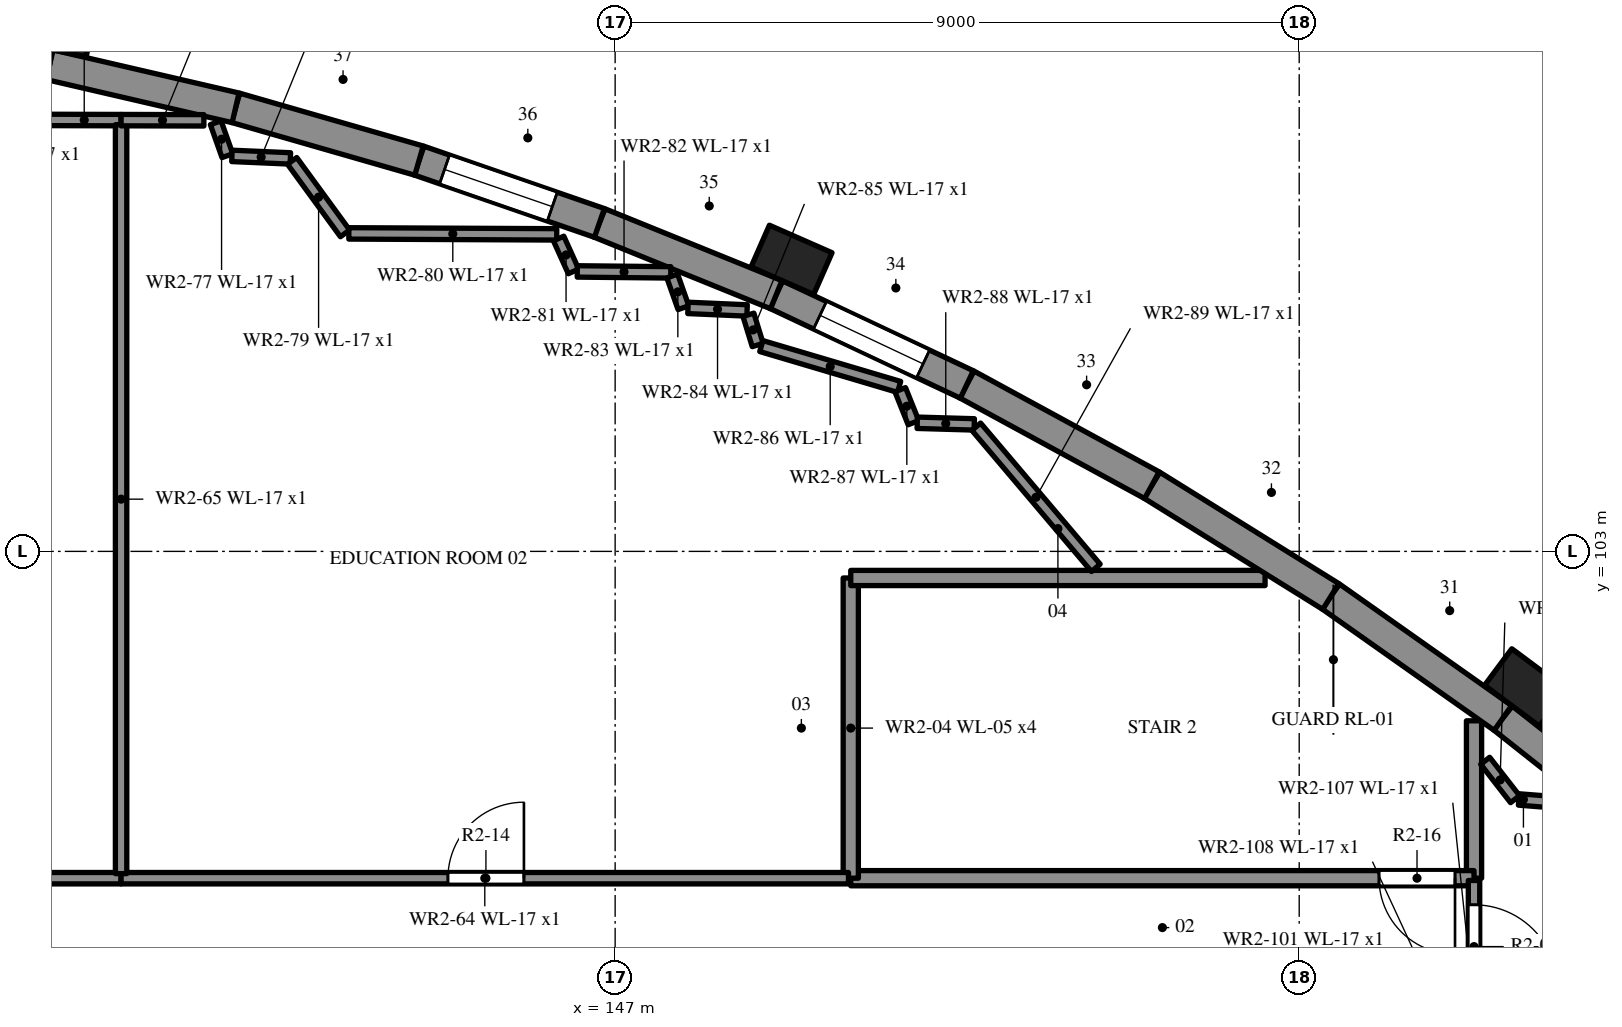
"""IFC4 building model, lengths in metres.
Left out: names, types, materials, properties, quantities, classifications, styles, units other than length and angle.
Written with IfcOpenShell. Run it as: python <this file> out.ifc"""

import sys

from ifc_helpers import new_model, si_unit, direction, frame, frame_2d, origin, origin_2d, place, context, subcontext, project, spatial, polyline, rectangle, outline, extrude, element, fill, save


model = new_model("IFC4")
c1 = context("Model", 3, precision=1e-05, world=origin(), true_north=direction((0.0, 1.0)))
c2 = subcontext(c1, "Body", "Model", "MODEL_VIEW")
j1 = project(units=[si_unit("LENGTHUNIT", "METRE"), si_unit("PLANEANGLEUNIT", "RADIAN")], contexts=[c1])
p1 = place(None, origin())
s1 = spatial("IfcSite", under=j1, at=p1, CompositionType="ELEMENT")
p2 = place(p1, origin())
s2 = spatial("IfcBuilding", under=s1, at=p2, CompositionType="ELEMENT")
p3 = place(p2, frame((0.0, 0.0, 10.2)))
s3 = spatial("IfcBuildingStorey", under=s2, at=p3, CompositionType="ELEMENT", Elevation=10.2)
p4 = place(p3, frame((158.3, 100.771, 0.0), z_axis=(0.0, 0.0, 1.0), x_axis=(0.0, -1.0, 0.0)))
e1 = element("IfcWall", 1, at=p4, inside=s3, PredefinedType="SHEAR", context=c2, shape_type="SweptSolid", body=[
    extrude(outline(polyline([(0.0, 0.0), (2.071, 0.0), (2.071, 5.912), (1.994, 5.842), (0.0, 4.028), (0.0, 0.0)])), frame((0.0, 0.1, 0.0), z_axis=(0.0, -1.0, 0.0), x_axis=(1.0, 0.0, 0.0)), (0.0, 0.0, 1.0), 0.2),
])
p5 = place(p3, frame((158.3, 98.7, 0.0), z_axis=(0.0, 0.0, 1.0), x_axis=(-1.0, 0.0, 0.0)))
e2 = element("IfcWall", 2, at=p5, inside=s3, PredefinedType="SHEAR", context=c2, shape_type="SweptSolid", body=[
    extrude(outline(polyline([(0.0, 0.0), (8.2, 0.0), (8.2, 9.347), (0.381, 5.882), (0.304, 5.911), (0.229, 5.899), (0.062, 5.861), (0.0, 5.845), (0.0, 0.0)])), frame((0.0, 0.1, 0.0), z_axis=(0.0, -1.0, 0.0), x_axis=(1.0, 0.0, 0.0)), (0.0, 0.0, 1.0), 0.2),
])
p6 = place(p5, frame((0.25, 0.0, 0.0)))
e3 = element("IfcOpeningElement", 3, at=p6, cuts=e2, PredefinedType="OPENING", context=c2, shape_type="SweptSolid", body=[
    extrude(rectangle(XDim=1.0, YDim=2.4, at=frame_2d((0.5, 1.2))), frame((0.0, 0.11, 0.0), z_axis=(0.0, -1.0, 0.0), x_axis=(1.0, 0.0, 0.0)), (0.0, 0.0, 1.0), 0.22),
])
p7 = place(p3, frame((150.1, 98.7, 0.0), z_axis=(0.0, 0.0, 1.0), x_axis=(0.0, 1.0, 0.0)))
e4 = element("IfcWall", 4, at=p7, inside=s3, PredefinedType="SHEAR", context=c2, shape_type="SweptSolid", body=[
    extrude(outline(polyline([(0.0, 0.0), (3.95, 0.0), (3.95, 6.132), (2.287, 7.484), (1.991, 7.714), (1.697, 7.948), (0.427, 8.954), (0.304, 9.081), (0.181, 9.214), (0.0, 9.411), (0.0, 0.0)])), frame((0.0, 0.1, 0.0), z_axis=(0.0, -1.0, 0.0), x_axis=(1.0, 0.0, 0.0)), (0.0, 0.0, 1.0), 0.2),
])
p8 = place(p3, frame((150.1, 102.65, 0.0), z_axis=(0.0, 0.0, 1.0), x_axis=(1.0, 0.0, 0.0)))
e5 = element("IfcWall", 5, at=p8, inside=s3, PredefinedType="SHEAR", context=c2, shape_type="SweptSolid", body=[
    extrude(outline(polyline([(0.0, 0.0), (5.451, 0.0), (5.451, 2.872), (4.967, 2.948), (4.89, 2.959), (4.814, 2.93), (3.049, 3.712), (2.968, 3.784), (2.886, 3.849), (0.698, 5.603), (0.63, 5.657), (0.0, 6.125), (0.0, 0.0)])), frame((0.0, 0.1, 0.0), z_axis=(0.0, -1.0, 0.0), x_axis=(1.0, 0.0, 0.0)), (0.0, 0.0, 1.0), 0.2),
])
p9 = place(p3, frame((160.613, 99.28, 0.0), z_axis=(0.0, 0.0, 1.0), x_axis=(-0.784278812541, 0.620408530082, 0.0)))
e6 = element("IfcWall", 6, at=p9, inside=s3, PredefinedType="SOLIDWALL", context=c2, shape_type="SweptSolid", body=[
    extrude(outline(polyline([(0.0, 0.0), (2.464, 0.0), (2.464, 3.551), (2.446, 3.544), (2.288, 3.486), (2.129, 3.428), (0.051, 2.669), (0.0, 2.651), (0.0, 0.0)])), frame((0.0, 0.2, 0.0), z_axis=(0.0, -1.0, 0.0), x_axis=(1.0, 0.0, 0.0)), (0.0, 0.0, 1.0), 0.4),
])
p10 = place(p3, frame((158.68, 100.809, 0.0), z_axis=(0.0, 0.0, 1.0), x_axis=(-0.817070367038, 0.57653795652, 0.0)))
e7 = element("IfcWall", 7, at=p10, inside=s3, PredefinedType="SOLIDWALL", context=c2, shape_type="SweptSolid", body=[
    extrude(outline(polyline([(0.0, 0.0), (2.772, 0.0), (2.772, 2.848), (2.406, 2.968), (0.311, 3.647), (0.169, 3.693), (0.0, 3.555), (0.0, 0.0)])), frame((0.0, 0.2, 0.0), z_axis=(0.0, -1.0, 0.0), x_axis=(1.0, 0.0, 0.0)), (0.0, 0.0, 1.0), 0.4),
])
p11 = place(p3, frame((156.415, 102.407, 0.0), z_axis=(0.0, 0.0, 1.0), x_axis=(-0.84912946359, 0.528184772653, 0.0)))
e8 = element("IfcWall", 8, at=p11, inside=s3, PredefinedType="SOLIDWALL", context=c2, shape_type="SweptSolid", body=[
    extrude(outline(polyline([(0.0, 0.0), (2.772, 0.0), (2.772, 1.97), (2.247, 2.14), (0.321, 2.757), (0.0, 2.845), (0.0, 0.0)])), frame((0.0, 0.2, 0.0), z_axis=(0.0, -1.0, 0.0), x_axis=(1.0, 0.0, 0.0)), (0.0, 0.0, 1.0), 0.4),
])
p12 = place(p3, frame((154.062, 103.871, 0.0), z_axis=(0.0, 0.0, 1.0), x_axis=(-0.878255502871, 0.478191668347, 0.0)))
e9 = element("IfcWall", 9, at=p12, inside=s3, PredefinedType="SOLIDWALL", context=c2, shape_type="SweptSolid", body=[
    extrude(outline(polyline([(0.0, 0.0), (2.772, 0.0), (2.772, 2.783), (2.737, 2.771), (0.081, 1.944), (0.0, 1.966), (0.0, 0.0)])), frame((0.0, 0.2, 0.0), z_axis=(0.0, -1.0, 0.0), x_axis=(1.0, 0.0, 0.0)), (0.0, 0.0, 1.0), 0.4),
])
p13 = place(p3, frame((151.627, 105.196, 0.0), z_axis=(0.0, 0.0, 1.0), x_axis=(-0.904561064695, 0.42634408667, 0.0)))
e10 = element("IfcWall", 10, at=p13, inside=s3, PredefinedType="SOLIDWALL", context=c2, shape_type="SweptSolid", body=[
    extrude(outline(polyline([(0.0, 0.0), (2.772, 0.0), (2.772, 3.692), (2.75, 3.685), (2.656, 3.655), (2.562, 3.624), (0.0, 2.787), (0.0, 0.0)])), frame((0.0, 0.2, 0.0), z_axis=(0.0, -1.0, 0.0), x_axis=(1.0, 0.0, 0.0)), (0.0, 0.0, 1.0), 0.4),
])
p14 = place(p13, frame((0.636, 0.0, 0.9)))
e11 = element("IfcOpeningElement", 11, at=p14, cuts=e10, PredefinedType="OPENING", context=c2, shape_type="SweptSolid", body=[
    extrude(rectangle(XDim=1.5, YDim=1.2, at=frame_2d((0.75, 0.6))), frame((0.0, 0.21, 0.0), z_axis=(0.0, -1.0, 0.0), x_axis=(1.0, 0.0, 0.0)), (0.0, 0.0, 1.0), 0.42),
])
p15 = place(p3, frame((149.12, 106.378, 0.0), z_axis=(0.0, 0.0, 1.0), x_axis=(-0.926688932252, 0.375829246921, 0.0)))
e12 = element("IfcWall", 12, at=p15, inside=s3, PredefinedType="SOLIDWALL", context=c2, shape_type="SweptSolid", body=[
    extrude(outline(polyline([(0.0, 0.0), (2.511, 0.0), (2.511, 2.896), (2.367, 2.947), (0.194, 3.726), (0.113, 3.755), (0.0, 3.696), (0.0, 0.0)])), frame((0.0, 0.2, 0.0), z_axis=(0.0, -1.0, 0.0), x_axis=(1.0, 0.0, 0.0)), (0.0, 0.0, 1.0), 0.4),
])
p16 = place(p3, frame((146.793, 107.322, 0.0), z_axis=(0.0, 0.0, 1.0), x_axis=(-0.945175475032, 0.326562890417, 0.0)))
e13 = element("IfcWall", 13, at=p16, inside=s3, PredefinedType="SOLIDWALL", context=c2, shape_type="SweptSolid", body=[
    extrude(outline(polyline([(0.0, 0.0), (2.511, 0.0), (2.511, 2.004), (2.321, 2.066), (0.129, 2.852), (0.0, 2.892), (0.0, 0.0)])), frame((0.0, 0.2, 0.0), z_axis=(0.0, -1.0, 0.0), x_axis=(1.0, 0.0, 0.0)), (0.0, 0.0, 1.0), 0.4),
])
p17 = place(p16, frame((0.656, 0.0, 0.9)))
e14 = element("IfcOpeningElement", 14, at=p17, cuts=e13, PredefinedType="OPENING", context=c2, shape_type="SweptSolid", body=[
    extrude(rectangle(XDim=1.5, YDim=0.9, at=frame_2d((0.75, 0.45))), frame((0.0, 0.21, 0.0), z_axis=(0.0, -1.0, 0.0), x_axis=(1.0, 0.0, 0.0)), (0.0, 0.0, 1.0), 0.42),
])
p18 = place(p3, frame((144.419, 108.142, 0.0), z_axis=(0.0, 0.0, 1.0), x_axis=(-0.961008605775, 0.276518461637, 0.0)))
e15 = element("IfcWall", 15, at=p18, inside=s3, PredefinedType="SOLIDWALL", context=c2, shape_type="SweptSolid", body=[
    extrude(outline(polyline([(0.0, 0.0), (2.511, 0.0), (2.511, 2.907), (2.499, 2.903), (0.0, 2.007), (0.0, 0.0)])), frame((0.0, 0.2, 0.0), z_axis=(0.0, -1.0, 0.0), x_axis=(1.0, 0.0, 0.0)), (0.0, 0.0, 1.0), 0.4),
])
p19 = place(p3, frame((142.006, 108.836, 0.0), z_axis=(0.0, 0.0, 1.0), x_axis=(-0.974189274843, 0.225732710925, 0.0)))
e16 = element("IfcWall", 16, at=p19, inside=s3, PredefinedType="SOLIDWALL", context=c2, shape_type="SweptSolid", body=[
    extrude(outline(polyline([(0.0, 0.0), (2.511, 0.0), (2.511, 3.813), (2.472, 3.799), (2.379, 3.766), (0.0, 2.911), (0.0, 0.0)])), frame((0.0, 0.2, 0.0), z_axis=(0.0, -1.0, 0.0), x_axis=(1.0, 0.0, 0.0)), (0.0, 0.0, 1.0), 0.4),
])
p20 = place(p3, frame((139.66, 109.893, 0.0), z_axis=(0.0, 0.0, 1.0), x_axis=(-0.979575047818, 0.201078904144, 0.0)))
e17 = element("IfcColumn", 17, at=p20, inside=s3, PredefinedType="PILASTER", context=c2, shape_type="SweptSolid", body=[
    extrude(rectangle(XDim=0.9, YDim=0.6, at=origin_2d()), origin(), (0.0, 0.0, 1.0), 3.247),
])
p21 = place(p3, frame((149.321, 106.836, 0.0), z_axis=(0.0, 0.0, 1.0), x_axis=(-0.915419314521, 0.402501526211, 0.0)))
e18 = element("IfcColumn", 18, at=p21, inside=s3, PredefinedType="PILASTER", context=c2, shape_type="SweptSolid", body=[
    extrude(rectangle(XDim=0.9, YDim=0.6, at=origin_2d()), origin(), (0.0, 0.0, 1.0), 2.91),
])
p22 = place(p3, frame((158.979, 101.209, 0.0), z_axis=(0.0, 0.0, 1.0), x_axis=(-0.80192785119, 0.597420891403, 0.0)))
e19 = element("IfcColumn", 19, at=p22, inside=s3, PredefinedType="PILASTER", context=c2, shape_type="SweptSolid", body=[
    extrude(rectangle(XDim=0.9, YDim=0.6, at=origin_2d()), origin(), (0.0, 0.0, 1.0), 2.507),
])
p23 = place(p3, frame((122.5, 98.7, 0.0), z_axis=(0.0, 0.0, 1.0), x_axis=(1.0, 0.0, 0.0)))
e20 = element("IfcWall", 20, at=p23, inside=s3, PredefinedType="PARTITIONING", context=c2, shape_type="SweptSolid", body=[
    extrude(rectangle(XDim=18.0, YDim=0.15, at=frame_2d((9.0, 0.0))), origin(), (0.0, 0.0, 1.0), 2.5),
])
p24 = place(p23, frame((12.6, 0.0, 0.0)))
e21 = element("IfcOpeningElement", 21, at=p24, cuts=e20, PredefinedType="OPENING", context=c2, shape_type="SweptSolid", body=[
    extrude(rectangle(XDim=1.8, YDim=2.1, at=frame_2d((0.9, 1.05))), frame((0.0, 0.085, 0.0), z_axis=(0.0, -1.0, 0.0), x_axis=(1.0, 0.0, 0.0)), (0.0, 0.0, 1.0), 0.17),
])
p25 = place(p23, frame((3.6, 0.0, 0.0)))
e22 = element("IfcOpeningElement", 22, at=p25, cuts=e20, PredefinedType="OPENING", context=c2, shape_type="SweptSolid", body=[
    extrude(rectangle(XDim=1.8, YDim=2.1, at=frame_2d((0.9, 1.05))), frame((0.0, 0.085, 0.0), z_axis=(0.0, -1.0, 0.0), x_axis=(1.0, 0.0, 0.0)), (0.0, 0.0, 1.0), 0.17),
])
p26 = place(p3, frame((139.53, 108.677, 0.0), z_axis=(0.0, 0.0, 1.0), x_axis=(0.999996832397, -0.002516981708, 0.0)))
e23 = element("IfcWall", 23, at=p26, inside=s3, PredefinedType="PARTITIONING", context=c2, shape_type="SweptSolid", body=[
    extrude(rectangle(XDim=0.97, YDim=0.15, at=frame_2d((0.485, 0.0))), origin(), (0.0, 0.0, 1.0), 2.5),
])
p27 = place(p3, frame((140.5, 98.7, 0.0), z_axis=(0.0, 0.0, 1.0), x_axis=(1.0, 0.0, 0.0)))
e24 = element("IfcWall", 24, at=p27, inside=s3, PredefinedType="PARTITIONING", context=c2, shape_type="SweptSolid", body=[
    extrude(rectangle(XDim=9.57, YDim=0.15, at=frame_2d((4.785, 0.0))), origin(), (0.0, 0.0, 1.0), 2.5),
])
p28 = place(p27, frame((4.3, 0.0, 0.0)))
e25 = element("IfcOpeningElement", 25, at=p28, cuts=e24, PredefinedType="OPENING", context=c2, shape_type="SweptSolid", body=[
    extrude(rectangle(XDim=1.0, YDim=2.1, at=frame_2d((0.5, 1.05))), frame((0.0, 0.085, 0.0), z_axis=(0.0, -1.0, 0.0), x_axis=(1.0, 0.0, 0.0)), (0.0, 0.0, 1.0), 0.17),
])
p29 = place(p3, frame((140.5, 108.615, 0.0), z_axis=(0.0, 0.0, 1.0), x_axis=(0.0, -1.0, 0.0)))
e26 = element("IfcWall", 26, at=p29, inside=s3, PredefinedType="PARTITIONING", context=c2, shape_type="SweptSolid", body=[
    extrude(rectangle(XDim=9.854, YDim=0.15, at=frame_2d((4.927, 0.0))), origin(), (0.0, 0.0, 1.0), 2.5),
])
p30 = place(p3, frame((140.5, 108.674, 0.0), z_axis=(0.0, 0.0, 1.0), x_axis=(0.999996961255, -0.002465254723, 0.0)))
e27 = element("IfcWall", 27, at=p30, inside=s3, PredefinedType="PARTITIONING", context=c2, shape_type="SweptSolid", body=[
    extrude(rectangle(XDim=1.089, YDim=0.15, at=frame_2d((0.545, 0.0))), origin(), (0.0, 0.0, 1.0), 2.5),
])
p31 = place(p3, frame((141.745, 108.64, 0.0), z_axis=(0.0, 0.0, 1.0), x_axis=(0.332903434189, -0.942960923636, 0.0)))
e28 = element("IfcWall", 28, at=p31, inside=s3, PredefinedType="PARTITIONING", context=c2, shape_type="SweptSolid", body=[
    extrude(rectangle(XDim=0.46, YDim=0.15, at=frame_2d((0.23, 0.0))), origin(), (0.0, 0.0, 1.0), 2.5),
])
p32 = place(p3, frame((141.958, 108.204, 0.0), z_axis=(0.0, 0.0, 1.0), x_axis=(0.999053760894, -0.043492330868, 0.0)))
e29 = element("IfcWall", 29, at=p32, inside=s3, PredefinedType="PARTITIONING", context=c2, shape_type="SweptSolid", body=[
    extrude(rectangle(XDim=0.769, YDim=0.15, at=frame_2d((0.385, 0.0))), origin(), (0.0, 0.0, 1.0), 2.5),
])
p33 = place(p3, frame((142.75, 108.138, 0.0), z_axis=(0.0, 0.0, 1.0), x_axis=(0.589326837147, -0.807894720257, 0.0)))
e30 = element("IfcWall", 30, at=p33, inside=s3, PredefinedType="PARTITIONING", context=c2, shape_type="SweptSolid", body=[
    extrude(rectangle(XDim=1.181, YDim=0.15, at=frame_2d((0.59, 0.0))), origin(), (0.0, 0.0, 1.0), 2.5),
])
p34 = place(p3, frame((143.496, 107.184, 0.0), z_axis=(0.0, 0.0, 1.0), x_axis=(0.99998881359, -0.004729978324, 0.0)))
e31 = element("IfcWall", 31, at=p34, inside=s3, PredefinedType="PARTITIONING", context=c2, shape_type="SweptSolid", body=[
    extrude(rectangle(XDim=2.736, YDim=0.15, at=frame_2d((1.368, 0.0))), origin(), (0.0, 0.0, 1.0), 2.5),
])
p35 = place(p3, frame((146.257, 107.117, 0.0), z_axis=(0.0, 0.0, 1.0), x_axis=(0.41147647075, -0.91142038271, 0.0)))
e32 = element("IfcWall", 32, at=p35, inside=s3, PredefinedType="PARTITIONING", context=c2, shape_type="SweptSolid", body=[
    extrude(rectangle(XDim=0.475, YDim=0.15, at=frame_2d((0.237, 0.0))), origin(), (0.0, 0.0, 1.0), 2.5),
])
p36 = place(p3, frame((146.502, 106.684, 0.0), z_axis=(0.0, 0.0, 1.0), x_axis=(0.99994878605, -0.010120537426, 0.0)))
e33 = element("IfcWall", 33, at=p36, inside=s3, PredefinedType="PARTITIONING", context=c2, shape_type="SweptSolid", body=[
    extrude(rectangle(XDim=1.23, YDim=0.15, at=frame_2d((0.615, 0.0))), origin(), (0.0, 0.0, 1.0), 2.5),
])
p37 = place(p3, frame((147.751, 106.623, 0.0), z_axis=(0.0, 0.0, 1.0), x_axis=(0.333253707731, -0.942837189701, 0.0)))
e34 = element("IfcWall", 34, at=p37, inside=s3, PredefinedType="PARTITIONING", context=c2, shape_type="SweptSolid", body=[
    extrude(rectangle(XDim=0.442, YDim=0.15, at=frame_2d((0.221, 0.0))), origin(), (0.0, 0.0, 1.0), 2.5),
])
p38 = place(p3, frame((147.958, 106.204, 0.0), z_axis=(0.0, 0.0, 1.0), x_axis=(0.999062069373, -0.043301057027, 0.0)))
e35 = element("IfcWall", 35, at=p38, inside=s3, PredefinedType="PARTITIONING", context=c2, shape_type="SweptSolid", body=[
    extrude(rectangle(XDim=0.778, YDim=0.15, at=frame_2d((0.389, 0.0))), origin(), (0.0, 0.0, 1.0), 2.5),
])
p39 = place(p3, frame((148.753, 106.113, 0.0), z_axis=(0.0, 0.0, 1.0), x_axis=(0.293755554764, -0.9558805752, 0.0)))
e36 = element("IfcWall", 36, at=p39, inside=s3, PredefinedType="PARTITIONING", context=c2, shape_type="SweptSolid", body=[
    extrude(rectangle(XDim=0.416, YDim=0.15, at=frame_2d((0.208, 0.0))), origin(), (0.0, 0.0, 1.0), 2.5),
])
p40 = place(p3, frame((148.924, 105.701, 0.0), z_axis=(0.0, 0.0, 1.0), x_axis=(0.958777261615, -0.284158692652, 0.0)))
e37 = element("IfcWall", 37, at=p40, inside=s3, PredefinedType="PARTITIONING", context=c2, shape_type="SweptSolid", body=[
    extrude(rectangle(XDim=1.89, YDim=0.15, at=frame_2d((0.945, 0.0))), origin(), (0.0, 0.0, 1.0), 2.5),
])
p41 = place(p3, frame((150.751, 105.127, 0.0), z_axis=(0.0, 0.0, 1.0), x_axis=(0.372292022066, -0.928115644899, 0.0)))
e38 = element("IfcWall", 38, at=p41, inside=s3, PredefinedType="PARTITIONING", context=c2, shape_type="SweptSolid", body=[
    extrude(rectangle(XDim=0.467, YDim=0.15, at=frame_2d((0.233, 0.0))), origin(), (0.0, 0.0, 1.0), 2.5),
])
p42 = place(p3, frame((150.975, 104.692, 0.0), z_axis=(0.0, 0.0, 1.0), x_axis=(0.999590227111, -0.028624777086, 0.0)))
e39 = element("IfcWall", 39, at=p42, inside=s3, PredefinedType="PARTITIONING", context=c2, shape_type="SweptSolid", body=[
    extrude(rectangle(XDim=0.75, YDim=0.15, at=frame_2d((0.375, 0.0))), origin(), (0.0, 0.0, 1.0), 2.5),
])
p43 = place(p3, frame((151.751, 104.64, 0.0), z_axis=(0.0, 0.0, 1.0), x_axis=(0.646468254161, -0.762940886545, 0.0)))
e40 = element("IfcWall", 40, at=p43, inside=s3, PredefinedType="PARTITIONING", context=c2, shape_type="SweptSolid", body=[
    extrude(rectangle(XDim=2.434, YDim=0.15, at=frame_2d((1.217, 0.0))), origin(), (0.0, 0.0, 1.0), 2.5),
])
p44 = place(p3, frame((158.3, 98.67, 0.0), z_axis=(0.0, 0.0, 1.0), x_axis=(0.0, -1.0, 0.0)))
e41 = element("IfcWall", 41, at=p44, inside=s3, PredefinedType="PARTITIONING", context=c2, shape_type="SweptSolid", body=[
    extrude(rectangle(XDim=1.77, YDim=0.15, at=frame_2d((0.885, 0.0))), origin(), (0.0, 0.0, 1.0), 2.5),
])
p45 = place(p44, frame((0.32, 0.0, 0.0)))
e42 = element("IfcOpeningElement", 42, at=p45, cuts=e41, PredefinedType="OPENING", context=c2, shape_type="SweptSolid", body=[
    extrude(rectangle(XDim=1.1, YDim=2.1, at=frame_2d((0.55, 1.05))), frame((0.0, 0.085, 0.0), z_axis=(0.0, -1.0, 0.0), x_axis=(1.0, 0.0, 0.0)), (0.0, 0.0, 1.0), 0.17),
])
p46 = place(p3, frame((158.447, 100.245, 0.0), z_axis=(0.0, 0.0, 1.0), x_axis=(0.614125450495, -0.789208420542, 0.0)))
e43 = element("IfcWall", 43, at=p46, inside=s3, PredefinedType="PARTITIONING", context=c2, shape_type="SweptSolid", body=[
    extrude(rectangle(XDim=0.64, YDim=0.15, at=frame_2d((0.32, 0.0))), origin(), (0.0, 0.0, 1.0), 2.5),
])
p47 = place(p3, frame((158.89, 99.736, 0.0), z_axis=(0.0, 0.0, 1.0), x_axis=(0.996876817873, -0.078972210225, 0.0)))
e44 = element("IfcWall", 44, at=p47, inside=s3, PredefinedType="PARTITIONING", context=c2, shape_type="SweptSolid", body=[
    extrude(rectangle(XDim=0.829, YDim=0.15, at=frame_2d((0.414, 0.0))), origin(), (0.0, 0.0, 1.0), 2.5),
])
p48 = place(p14, origin())
e45 = element("IfcWindow", 45, at=p48, inside=s3, PartitioningType="SINGLE_PANEL", PredefinedType="WINDOW", context=c2, shape_type="SweptSolid", body=[
    extrude(rectangle(XDim=1.5, YDim=1.2, at=frame_2d((0.75, 0.6))), frame((0.0, 0.03, 0.0), z_axis=(0.0, -1.0, 0.0), x_axis=(1.0, 0.0, 0.0)), (0.0, 0.0, 1.0), 0.06),
])
fill(e11, e45)
p49 = place(p17, origin())
e46 = element("IfcWindow", 46, at=p49, inside=s3, PartitioningType="SINGLE_PANEL", PredefinedType="WINDOW", context=c2, shape_type="SweptSolid", body=[
    extrude(rectangle(XDim=1.5, YDim=0.9, at=frame_2d((0.75, 0.45))), frame((0.0, 0.03, 0.0), z_axis=(0.0, -1.0, 0.0), x_axis=(1.0, 0.0, 0.0)), (0.0, 0.0, 1.0), 0.06),
])
fill(e14, e46)
p50 = place(p45, origin())
e47 = element("IfcDoor", 47, at=p50, inside=s3, OperationType="SINGLE_SWING_RIGHT", PredefinedType="DOOR", context=c2, shape_type="SweptSolid", body=[
    extrude(rectangle(XDim=1.1, YDim=2.1, at=frame_2d((0.55, 1.05))), frame((0.0, 0.025, 0.0), z_axis=(0.0, -1.0, 0.0), x_axis=(1.0, 0.0, 0.0)), (0.0, 0.0, 1.0), 0.05),
])
fill(e42, e47)
p51 = place(p28, origin())
e48 = element("IfcDoor", 48, at=p51, inside=s3, OperationType="SINGLE_SWING_RIGHT", PredefinedType="DOOR", context=c2, shape_type="SweptSolid", body=[
    extrude(rectangle(XDim=1.0, YDim=2.1, at=frame_2d((0.5, 1.05))), frame((0.0, 0.025, 0.0), z_axis=(0.0, -1.0, 0.0), x_axis=(1.0, 0.0, 0.0)), (0.0, 0.0, 1.0), 0.05),
])
fill(e25, e48)
p52 = place(p6, origin())
e49 = element("IfcDoor", 49, at=p52, inside=s3, OperationType="SINGLE_SWING_LEFT", PredefinedType="DOOR", context=c2, shape_type="SweptSolid", body=[
    extrude(rectangle(XDim=1.0, YDim=2.4, at=frame_2d((0.5, 1.2))), frame((0.0, 0.025, 0.0), z_axis=(0.0, -1.0, 0.0), x_axis=(1.0, 0.0, 0.0)), (0.0, 0.0, 1.0), 0.05),
])
fill(e3, e49)
save(model, sys.argv[1])
